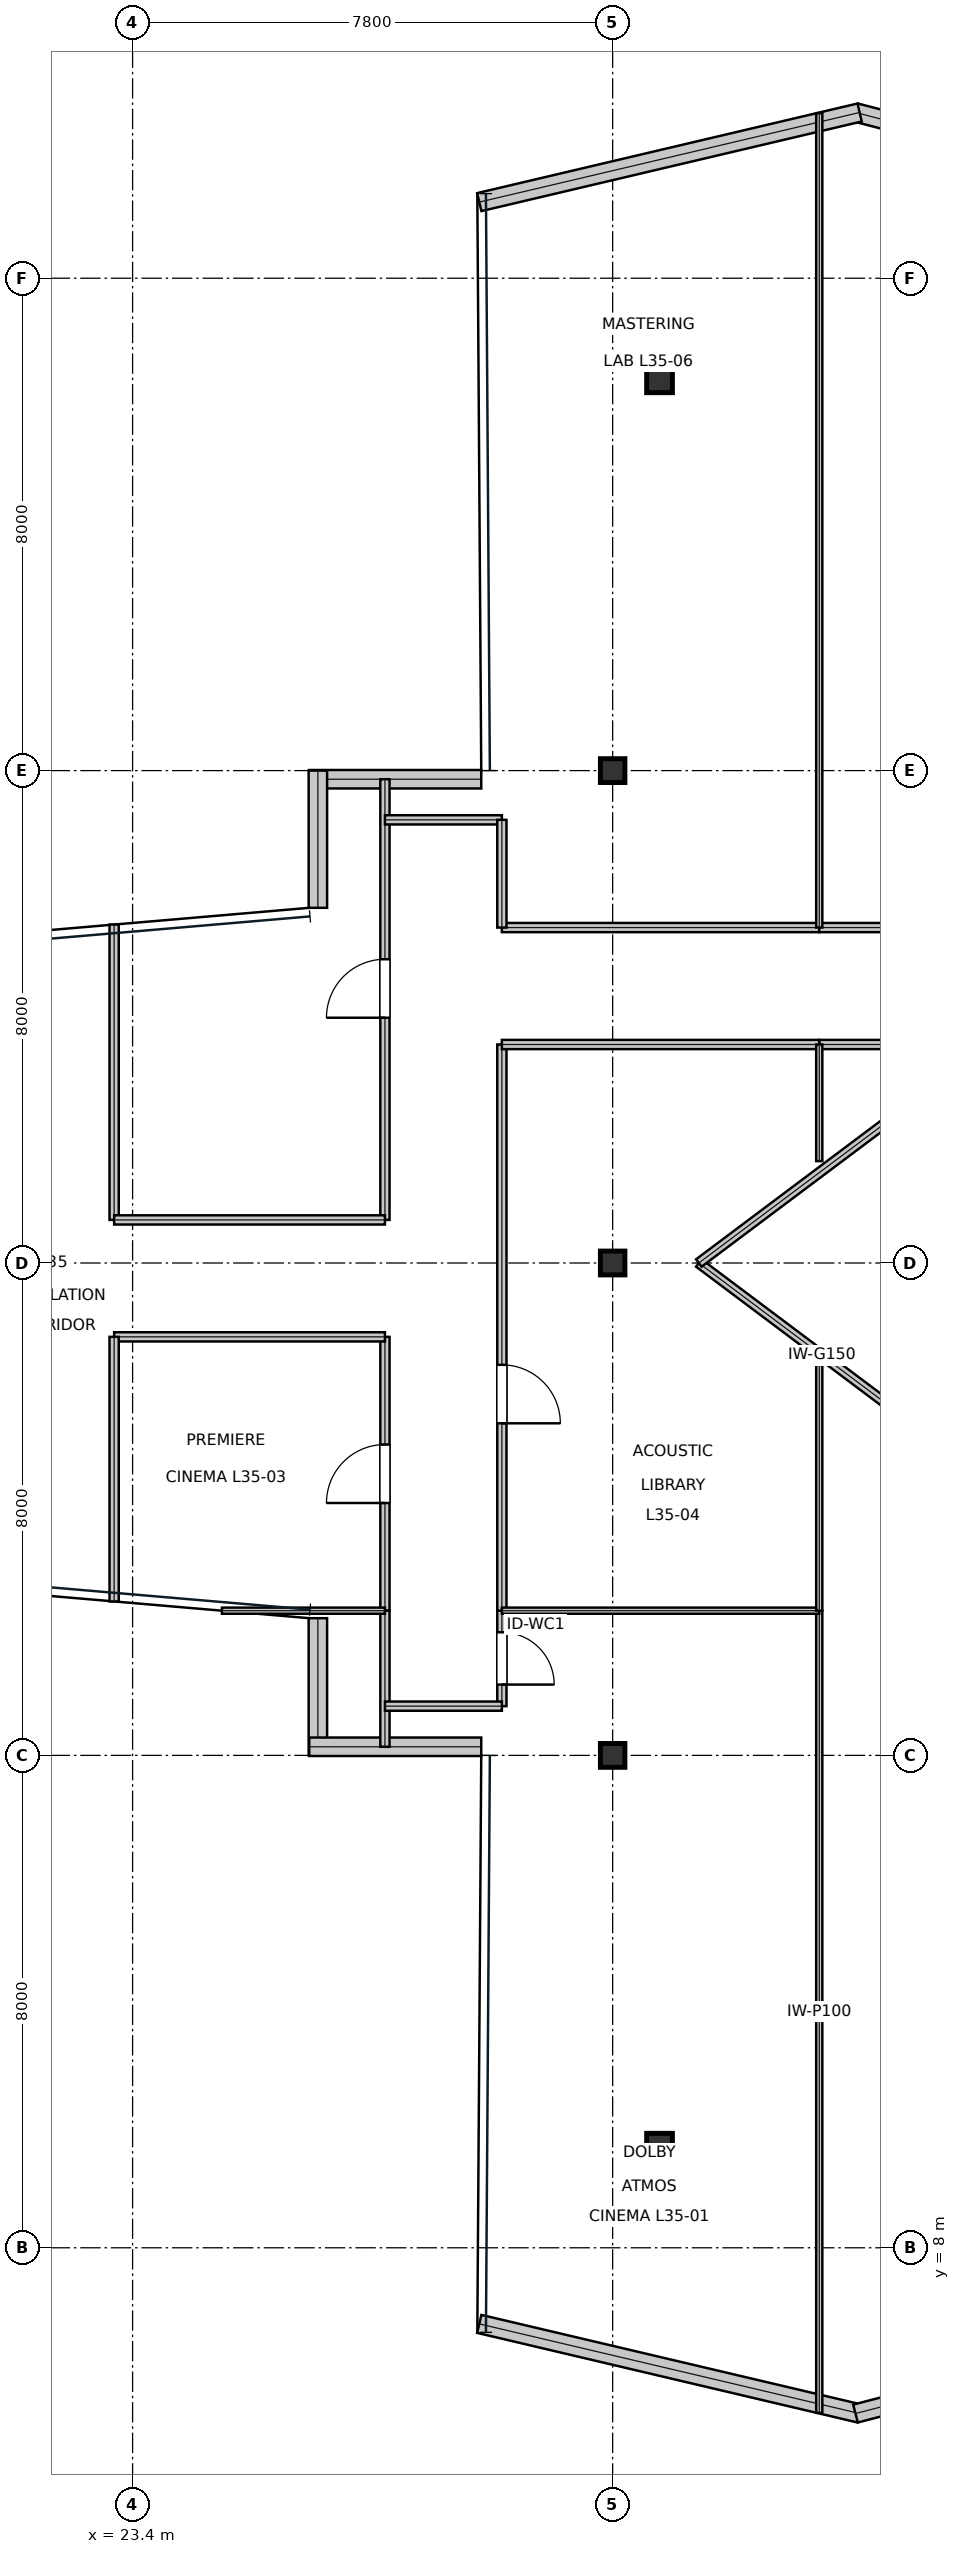
"""IFC4 building model, lengths in metres.
Left out: names, types, materials, properties, quantities, classifications, styles, units other than length and angle.
Written with IfcOpenShell. Run it as: python <this file> out.ifc"""

import sys

from ifc_helpers import new_model, si_unit, direction, frame, frame_2d, origin, origin_2d, place, context, subcontext, project, spatial, rectangle, i_section, extrude, element, fill, save


model = new_model("IFC4")
c1 = context("Model", 3, precision=1e-05, world=origin(), true_north=direction((0.0, 1.0)))
c2 = subcontext(c1, "Body", "Model", "MODEL_VIEW")
j1 = project(units=[si_unit("LENGTHUNIT", "METRE"), si_unit("PLANEANGLEUNIT", "RADIAN")], contexts=[c1])
p1 = place(None, origin())
s1 = spatial("IfcSite", under=j1, at=p1, CompositionType="ELEMENT")
p2 = place(p1, origin())
s2 = spatial("IfcBuilding", under=s1, at=p2, CompositionType="ELEMENT")
p3 = place(p2, frame((0.0, 0.0, 153.3)))
s3 = spatial("IfcBuildingStorey", under=s2, at=p3, CompositionType="ELEMENT", Elevation=153.3)
for number, where, z_axis, x_axis in (
    (1, (31.2, 16.0, 0.0), (0.0, 0.0, 1.0), (1.0, 0.0, 0.0)),
    (2, (31.2, 24.0, 0.0), (0.0, 0.0, 1.0), (1.0, 0.0, 0.0)),
    (3, (31.2, 32.0, 0.0), (0.0, 0.0, 1.0), (1.0, 0.0, 0.0)),
):
    element("IfcColumn", number, at=place(p3, frame(where, z_axis=z_axis, x_axis=x_axis)), inside=s3, PredefinedType="COLUMN", context=c2, shape_type="SweptSolid", body=[
        extrude(i_section(OverallWidth=0.398, OverallDepth=0.387, WebThickness=0.021, FlangeThickness=0.033, at=origin_2d()), origin(), (0.0, 0.0, 1.0), 4.044),
    ])
for number, where, z_axis, x_axis in (
    (4, (31.962, 38.368, 0.016), (0.0, 0.0, 1.0), (1.0, 0.0, 0.0)),
    (5, (31.962, 9.632, 0.016), (0.0, 0.0, 1.0), (1.0, 0.0, 0.0)),
):
    element("IfcColumn", number, at=place(p3, frame(where, z_axis=z_axis, x_axis=x_axis)), inside=s3, PredefinedType="COLUMN", context=c2, shape_type="SweptSolid", body=[
        extrude(i_section(OverallWidth=0.418, OverallDepth=0.455, WebThickness=0.042, FlangeThickness=0.068, at=origin_2d()), origin(), (0.0, 0.0, 1.0), 4.018),
    ])
p4 = place(p3, frame((41.325, 41.092, 0.0), z_axis=(0.0, 0.0, 1.0), x_axis=(-0.96801891639, 0.250877216005, 0.0)))
e6 = element("IfcWall", 6, at=p4, inside=s3, PredefinedType="STANDARD", context=c2, shape_type="SweptSolid", body=[
    extrude(rectangle(XDim=6.384, YDim=0.3, at=frame_2d((3.192, 0.0))), origin(), (0.0, 0.0, 1.0), 3.81),
])
p5 = place(p3, frame((35.213, 42.692, 0.0), z_axis=(0.0, 0.0, 1.0), x_axis=(-0.973355101444, -0.229302957882, 0.0)))
e7 = element("IfcWall", 7, at=p5, inside=s3, PredefinedType="STANDARD", context=c2, shape_type="SweptSolid", body=[
    extrude(rectangle(XDim=6.349, YDim=0.3, at=frame_2d((3.174, 0.0))), origin(), (0.0, 0.0, 1.0), 3.81),
])
p6 = place(p3, frame((29.065, 31.86, 0.0), z_axis=(0.0, 0.0, 1.0), x_axis=(-1.0, 0.0, 0.0)))
e8 = element("IfcWall", 8, at=p6, inside=s3, PredefinedType="STANDARD", context=c2, shape_type="SweptSolid", body=[
    extrude(rectangle(XDim=2.794, YDim=0.3, at=frame_2d((1.397, 0.0))), origin(), (0.0, 0.0, 1.0), 3.81),
])
for number, where, z_axis, x_axis in (
    (9, (26.41, 32.0, 0.0), (0.0, 0.0, 1.0), (0.0, -1.0, 0.0)),
    (10, (26.41, 18.229, 0.0), (0.0, 0.0, 1.0), (0.0, -1.0, 0.0)),
):
    element("IfcWall", number, at=place(p3, frame(where, z_axis=z_axis, x_axis=x_axis)), inside=s3, PredefinedType="STANDARD", context=c2, shape_type="SweptSolid", body=[
        extrude(rectangle(XDim=2.229, YDim=0.3, at=frame_2d((1.115, 0.0))), origin(), (0.0, 0.0, 1.0), 3.338),
    ])
p7 = place(p3, frame((26.271, 16.14, 0.0), z_axis=(0.0, 0.0, 1.0), x_axis=(1.0, 0.0, 0.0)))
e11 = element("IfcWall", 11, at=p7, inside=s3, PredefinedType="STANDARD", context=c2, shape_type="SweptSolid", body=[
    extrude(rectangle(XDim=2.794, YDim=0.3, at=frame_2d((1.397, 0.0))), origin(), (0.0, 0.0, 1.0), 3.81),
])
p8 = place(p3, frame((29.033, 6.763, 0.0), z_axis=(0.0, 0.0, 1.0), x_axis=(0.973355101444, -0.229302957882, 0.0)))
e12 = element("IfcWall", 12, at=p8, inside=s3, PredefinedType="STANDARD", context=c2, shape_type="SweptSolid", body=[
    extrude(rectangle(XDim=6.349, YDim=0.3, at=frame_2d((3.174, 0.0))), origin(), (0.0, 0.0, 1.0), 3.81),
])
p9 = place(p3, frame((35.146, 5.307, 0.0), z_axis=(0.0, 0.0, 1.0), x_axis=(0.96801891639, 0.250877216005, 0.0)))
e13 = element("IfcWall", 13, at=p9, inside=s3, PredefinedType="STANDARD", context=c2, shape_type="SweptSolid", body=[
    extrude(rectangle(XDim=6.384, YDim=0.3, at=frame_2d((3.192, 0.0))), origin(), (0.0, 0.0, 1.0), 3.81),
])
p10 = place(p3, frame((29.4, 16.8, 0.0), z_axis=(0.0, 0.0, 1.0), x_axis=(0.0, 1.0, 0.0)))
e14 = element("IfcWall", 14, at=p10, inside=s3, PredefinedType="PARTITIONING", context=c2, shape_type="SweptSolid", body=[
    extrude(rectangle(XDim=1.551, YDim=0.15, at=frame_2d((0.775, 0.0))), origin(), (0.0, 0.0, 1.0), 3.81),
])
p11 = place(p10, frame((0.351, 0.0, 0.0)))
e15 = element("IfcOpeningElement", 15, at=p11, cuts=e14, PredefinedType="OPENING", context=c2, shape_type="SweptSolid", body=[
    extrude(rectangle(XDim=0.85, YDim=2.15, at=frame_2d((0.425, 1.075))), frame((0.0, 0.085, 0.0), z_axis=(0.0, -1.0, 0.0), x_axis=(1.0, 0.0, 0.0)), (0.0, 0.0, 1.0), 0.17),
])
p12 = place(p3, frame((27.5, 18.351, 0.0), z_axis=(0.0, 0.0, 1.0), x_axis=(0.0, 1.0, 0.0)))
e16 = element("IfcWall", 16, at=p12, inside=s3, PredefinedType="PARTITIONING", context=c2, shape_type="SweptSolid", body=[
    extrude(rectangle(XDim=4.449, YDim=0.15, at=frame_2d((2.225, 0.0))), origin(), (0.0, 0.0, 1.0), 3.81),
])
p13 = place(p12, frame((1.75, 0.0, 0.0)))
e17 = element("IfcOpeningElement", 17, at=p13, cuts=e16, PredefinedType="OPENING", context=c2, shape_type="SweptSolid", body=[
    extrude(rectangle(XDim=0.95, YDim=2.15, at=frame_2d((0.475, 1.075))), frame((0.0, 0.085, 0.0), z_axis=(0.0, -1.0, 0.0), x_axis=(1.0, 0.0, 0.0)), (0.0, 0.0, 1.0), 0.17),
])
p14 = place(p3, frame((29.4, 18.351, 0.0), z_axis=(0.0, 0.0, 1.0), x_axis=(0.0, 1.0, 0.0)))
e18 = element("IfcWall", 18, at=p14, inside=s3, PredefinedType="PARTITIONING", context=c2, shape_type="SweptSolid", body=[
    extrude(rectangle(XDim=9.199, YDim=0.15, at=frame_2d((4.6, 0.0))), origin(), (0.0, 0.0, 1.0), 3.19),
])
p15 = place(p14, frame((3.044, 0.0, 0.0)))
e19 = element("IfcOpeningElement", 19, at=p15, cuts=e18, PredefinedType="OPENING", context=c2, shape_type="SweptSolid", body=[
    extrude(rectangle(XDim=0.95, YDim=2.15, at=frame_2d((0.475, 1.075))), frame((0.0, 0.085, 0.0), z_axis=(0.0, -1.0, 0.0), x_axis=(1.0, 0.0, 0.0)), (0.0, 0.0, 1.0), 0.17),
])
p16 = place(p3, frame((27.5, 24.7, 0.0), z_axis=(0.0, 0.0, 1.0), x_axis=(0.0, 1.0, 0.0)))
e20 = element("IfcWall", 20, at=p16, inside=s3, PredefinedType="PARTITIONING", context=c2, shape_type="SweptSolid", body=[
    extrude(rectangle(XDim=7.16, YDim=0.15, at=frame_2d((3.58, 0.0))), origin(), (0.0, 0.0, 1.0), 3.338),
])
p17 = place(p16, frame((3.285, 0.0, 0.0)))
e21 = element("IfcOpeningElement", 21, at=p17, cuts=e20, PredefinedType="OPENING", context=c2, shape_type="SweptSolid", body=[
    extrude(rectangle(XDim=0.95, YDim=2.15, at=frame_2d((0.475, 1.075))), frame((0.0, 0.085, 0.0), z_axis=(0.0, -1.0, 0.0), x_axis=(1.0, 0.0, 0.0)), (0.0, 0.0, 1.0), 0.17),
])
p18 = place(p3, frame((27.5, 16.14, 0.0), z_axis=(0.0, 0.0, 1.0), x_axis=(0.0, 1.0, 0.0)))
e22 = element("IfcWall", 22, at=p18, inside=s3, PredefinedType="PARTITIONING", context=c2, shape_type="SweptSolid", body=[
    extrude(rectangle(XDim=2.211, YDim=0.15, at=frame_2d((1.105, 0.0))), origin(), (0.0, 0.0, 1.0), 3.338),
])
p19 = place(p3, frame((27.5, 16.8, 0.0), z_axis=(0.0, 0.0, 1.0), x_axis=(1.0, 0.0, 0.0)))
e23 = element("IfcWall", 23, at=p19, inside=s3, PredefinedType="PARTITIONING", context=c2, shape_type="SweptSolid", body=[
    extrude(rectangle(XDim=1.9, YDim=0.15, at=frame_2d((0.95, 0.0))), origin(), (0.0, 0.0, 1.0), 3.338),
])
p20 = place(p3, frame((34.557, 27.55, 0.0), z_axis=(0.0, 0.0, 1.0), x_axis=(1.0, 0.0, 0.0)))
e24 = element("IfcWall", 24, at=p20, inside=s3, PredefinedType="PARTITIONING", context=c2, shape_type="SweptSolid", body=[
    extrude(rectangle(XDim=2.493, YDim=0.15, at=frame_2d((1.247, 0.0))), origin(), (0.0, 0.0, 1.0), 3.443),
])
p21 = place(p3, frame((23.1, 22.8, 0.0), z_axis=(0.0, 0.0, 1.0), x_axis=(1.0, 0.0, 0.0)))
e25 = element("IfcWall", 25, at=p21, inside=s3, PredefinedType="PARTITIONING", context=c2, shape_type="SweptSolid", body=[
    extrude(rectangle(XDim=4.4, YDim=0.15, at=frame_2d((2.2, 0.0))), origin(), (0.0, 0.0, 1.0), 3.19),
])
p22 = place(p3, frame((23.1, 18.501, 0.0), z_axis=(0.0, 0.0, 1.0), x_axis=(0.0, 1.0, 0.0)))
e26 = element("IfcWall", 26, at=p22, inside=s3, PredefinedType="PARTITIONING", context=c2, shape_type="SweptSolid", body=[
    extrude(rectangle(XDim=4.299, YDim=0.15, at=frame_2d((2.149, 0.0))), origin(), (0.0, 0.0, 1.0), 3.19),
])
for number, where, z_axis, x_axis in (
    (27, (29.4, 27.55, 0.0), (0.0, 0.0, 1.0), (1.0, 0.0, 0.0)),
    (28, (29.4, 29.45, 0.0), (0.0, 0.0, 1.0), (1.0, 0.0, 0.0)),
):
    element("IfcWall", number, at=place(p3, frame(where, z_axis=z_axis, x_axis=x_axis)), inside=s3, PredefinedType="PARTITIONING", context=c2, shape_type="SweptSolid", body=[
        extrude(rectangle(XDim=5.157, YDim=0.15, at=frame_2d((2.579, 0.0))), origin(), (0.0, 0.0, 1.0), 3.19),
    ])
p23 = place(p3, frame((23.1, 24.7, 0.0), z_axis=(0.0, 0.0, 1.0), x_axis=(0.0, 1.0, 0.0)))
e29 = element("IfcWall", 29, at=p23, inside=s3, PredefinedType="PARTITIONING", context=c2, shape_type="SweptSolid", body=[
    extrude(rectangle(XDim=4.799, YDim=0.15, at=frame_2d((2.399, 0.0))), origin(), (0.0, 0.0, 1.0), 3.19),
])
p24 = place(p3, frame((23.1, 24.7, 0.0), z_axis=(0.0, 0.0, 1.0), x_axis=(1.0, 0.0, 0.0)))
e30 = element("IfcWall", 30, at=p24, inside=s3, PredefinedType="PARTITIONING", context=c2, shape_type="SweptSolid", body=[
    extrude(rectangle(XDim=4.4, YDim=0.15, at=frame_2d((2.2, 0.0))), origin(), (0.0, 0.0, 1.0), 3.19),
])
p25 = place(p3, frame((27.5, 31.2, 0.0), z_axis=(0.0, 0.0, 1.0), x_axis=(1.0, 0.0, 0.0)))
e31 = element("IfcWall", 31, at=p25, inside=s3, PredefinedType="PARTITIONING", context=c2, shape_type="SweptSolid", body=[
    extrude(rectangle(XDim=1.9, YDim=0.15, at=frame_2d((0.95, 0.0))), origin(), (0.0, 0.0, 1.0), 3.338),
])
p26 = place(p3, frame((29.4, 29.45, 0.0), z_axis=(0.0, 0.0, 1.0), x_axis=(0.0, 1.0, 0.0)))
e32 = element("IfcWall", 32, at=p26, inside=s3, PredefinedType="PARTITIONING", context=c2, shape_type="SweptSolid", body=[
    extrude(rectangle(XDim=1.75, YDim=0.15, at=frame_2d((0.875, 0.0))), origin(), (0.0, 0.0, 1.0), 3.81),
])
p27 = place(p3, frame((34.557, 29.45, 0.0), z_axis=(0.0, 0.0, 1.0), x_axis=(1.0, 0.0, 0.0)))
e33 = element("IfcWall", 33, at=p27, inside=s3, PredefinedType="PARTITIONING", context=c2, shape_type="SweptSolid", body=[
    extrude(rectangle(XDim=2.493, YDim=0.15, at=frame_2d((1.247, 0.0))), origin(), (0.0, 0.0, 1.0), 3.81),
])
p28 = place(p3, frame((34.557, 5.318, 0.0), z_axis=(0.0, 0.0, 1.0), x_axis=(0.0, 1.0, 0.0)))
e34 = element("IfcWall", 34, at=p28, inside=s3, PredefinedType="PARTITIONING", context=c2, shape_type="SweptSolid", body=[
    extrude(rectangle(XDim=13.033, YDim=0.1, at=frame_2d((6.517, 0.0))), origin(), (0.0, 0.0, 1.0), 3.19),
])
p29 = place(p3, frame((24.851, 18.351, 0.0), z_axis=(0.0, 0.0, 1.0), x_axis=(1.0, 0.0, 0.0)))
e35 = element("IfcWall", 35, at=p29, inside=s3, PredefinedType="PARTITIONING", context=c2, shape_type="SweptSolid", body=[
    extrude(rectangle(XDim=2.649, YDim=0.1, at=frame_2d((1.324, 0.0))), origin(), (0.0, 0.0, 1.0), 3.81),
])
p30 = place(p3, frame((29.4, 18.351, 0.0), z_axis=(0.0, 0.0, 1.0), x_axis=(1.0, 0.0, 0.0)))
e36 = element("IfcWall", 36, at=p30, inside=s3, PredefinedType="PARTITIONING", context=c2, shape_type="SweptSolid", body=[
    extrude(rectangle(XDim=5.157, YDim=0.1, at=frame_2d((2.579, 0.0))), origin(), (0.0, 0.0, 1.0), 3.19),
])
p31 = place(p3, frame((34.557, 18.351, 0.0), z_axis=(0.0, 0.0, 1.0), x_axis=(0.0, 1.0, 0.0)))
e37 = element("IfcWall", 37, at=p31, inside=s3, PredefinedType="PARTITIONING", context=c2, shape_type="SweptSolid", body=[
    extrude(rectangle(XDim=3.994, YDim=0.1, at=frame_2d((1.997, 0.0))), origin(), (0.0, 0.0, 1.0), 3.81),
])
p32 = place(p3, frame((34.557, 25.655, 0.0), z_axis=(0.0, 0.0, 1.0), x_axis=(0.0, 1.0, 0.0)))
e38 = element("IfcWall", 38, at=p32, inside=s3, PredefinedType="PARTITIONING", context=c2, shape_type="SweptSolid", body=[
    extrude(rectangle(XDim=1.895, YDim=0.1, at=frame_2d((0.947, 0.0))), origin(), (0.0, 0.0, 1.0), 3.81),
])
p33 = place(p3, frame((34.557, 29.45, 0.0), z_axis=(0.0, 0.0, 1.0), x_axis=(0.0, 1.0, 0.0)))
e39 = element("IfcWall", 39, at=p33, inside=s3, PredefinedType="PARTITIONING", context=c2, shape_type="SweptSolid", body=[
    extrude(rectangle(XDim=13.232, YDim=0.1, at=frame_2d((6.616, 0.0))), origin(), (0.0, 0.0, 1.0), 3.19),
])
for number, where, z_axis, x_axis in (
    (40, (32.6, 24.0, 0.0), (0.0, 0.0, 1.0), (0.8, -0.6, 0.0)),
    (41, (36.6, 27.0, 0.0), (0.0, 0.0, 1.0), (-0.8, -0.6, 0.0)),
):
    element("IfcWall", number, at=place(p3, frame(where, z_axis=z_axis, x_axis=x_axis)), inside=s3, PredefinedType="MOVABLE", context=c2, shape_type="SweptSolid", body=[
        extrude(rectangle(XDim=5.0, YDim=0.15, at=frame_2d((2.5, 0.0))), origin(), (0.0, 0.0, 1.0), 3.81),
    ])
p34 = place(p11, frame((0.85, 0.0, 0.0), z_axis=(0.0, 0.0, 1.0), x_axis=(-1.0, 0.0, 0.0)))
e42 = element("IfcDoor", 42, at=p34, inside=s3, OperationType="SINGLE_SWING_RIGHT", PredefinedType="DOOR", context=c2, shape_type="SweptSolid", body=[
    extrude(rectangle(XDim=0.85, YDim=2.15, at=frame_2d((0.425, 1.075))), frame((0.0, 0.025, 0.0), z_axis=(0.0, -1.0, 0.0), x_axis=(1.0, 0.0, 0.0)), (0.0, 0.0, 1.0), 0.05),
])
fill(e15, e42)
p35 = place(p13, origin())
e43 = element("IfcDoor", 43, at=p35, inside=s3, OperationType="SINGLE_SWING_LEFT", PredefinedType="DOOR", context=c2, shape_type="SweptSolid", body=[
    extrude(rectangle(XDim=0.95, YDim=2.15, at=frame_2d((0.475, 1.075))), frame((0.0, 0.025, 0.0), z_axis=(0.0, -1.0, 0.0), x_axis=(1.0, 0.0, 0.0)), (0.0, 0.0, 1.0), 0.05),
])
fill(e17, e43)
p36 = place(p15, frame((0.95, 0.0, 0.0), z_axis=(0.0, 0.0, 1.0), x_axis=(-1.0, 0.0, 0.0)))
e44 = element("IfcDoor", 44, at=p36, inside=s3, OperationType="SINGLE_SWING_RIGHT", PredefinedType="DOOR", context=c2, shape_type="SweptSolid", body=[
    extrude(rectangle(XDim=0.95, YDim=2.15, at=frame_2d((0.475, 1.075))), frame((0.0, 0.025, 0.0), z_axis=(0.0, -1.0, 0.0), x_axis=(1.0, 0.0, 0.0)), (0.0, 0.0, 1.0), 0.05),
])
fill(e19, e44)
p37 = place(p17, origin())
e45 = element("IfcDoor", 45, at=p37, inside=s3, OperationType="SINGLE_SWING_LEFT", PredefinedType="DOOR", context=c2, shape_type="SweptSolid", body=[
    extrude(rectangle(XDim=0.95, YDim=2.15, at=frame_2d((0.475, 1.075))), frame((0.0, 0.025, 0.0), z_axis=(0.0, -1.0, 0.0), x_axis=(1.0, 0.0, 0.0)), (0.0, 0.0, 1.0), 0.05),
])
fill(e21, e45)
save(model, sys.argv[1])
